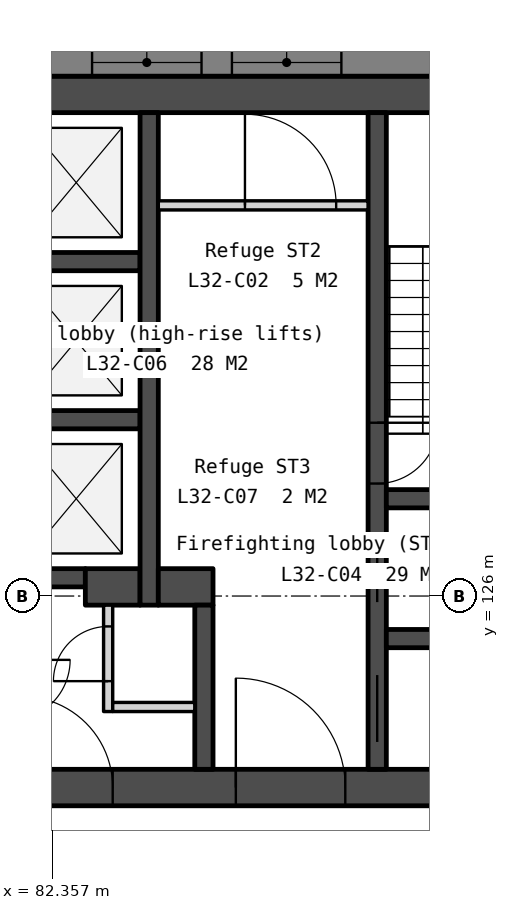
"""IFC4 building model, lengths in metres.
Left out: names, types, materials, properties, quantities, classifications, styles, units other than length and angle.
Written with IfcOpenShell. Run it as: python <this file> out.ifc"""

import sys

from ifc_helpers import new_model, si_unit, direction, frame, frame_2d, origin, place, context, subcontext, project, spatial, polyline, rectangle, outline, extrude, element, fill, save


model = new_model("IFC4")
c1 = context("Model", 3, precision=1e-05, world=origin(), true_north=direction((0.0, 1.0)))
c2 = subcontext(c1, "Body", "Model", "MODEL_VIEW")
j1 = project(units=[si_unit("LENGTHUNIT", "METRE"), si_unit("PLANEANGLEUNIT", "RADIAN")], contexts=[c1])
p1 = place(None, origin())
s1 = spatial("IfcSite", under=j1, at=p1, CompositionType="ELEMENT")
p2 = place(p1, origin())
s2 = spatial("IfcBuilding", under=s1, at=p2, CompositionType="ELEMENT")
p3 = place(p2, frame((0.0, 0.0, 128.6)))
s3 = spatial("IfcBuildingStorey", under=s2, at=p3, CompositionType="ELEMENT", Elevation=128.6)
p4 = place(p3, frame((69.0, 134.25, 0.0), z_axis=(0.0, 0.0, 1.0), x_axis=(1.0, 0.0, 0.0)))
e1 = element("IfcWall", 1, at=p4, inside=s3, PredefinedType="SOLIDWALL", context=c2, shape_type="SweptSolid", body=[
    extrude(rectangle(XDim=22.0, YDim=0.6, at=frame_2d((11.0, 0.0))), origin(), (0.0, 0.0, 1.0), 3.75),
])
p5 = place(p3, frame((69.0, 122.85, 0.0), z_axis=(0.0, 0.0, 1.0), x_axis=(1.0, 0.0, 0.0)))
e2 = element("IfcWall", 2, at=p5, inside=s3, PredefinedType="SOLIDWALL", context=c2, shape_type="SweptSolid", body=[
    extrude(rectangle(XDim=22.0, YDim=0.6, at=frame_2d((11.0, 0.0))), origin(), (0.0, 0.0, 1.0), 3.75),
])
p6 = place(p5, frame((16.375, 0.0, 0.0)))
e3 = element("IfcOpeningElement", 3, at=p6, cuts=e2, PredefinedType="OPENING", context=c2, shape_type="SweptSolid", body=[
    extrude(rectangle(XDim=1.8, YDim=2.1, at=frame_2d((0.9, 1.05))), frame((0.0, 0.31, 0.0), z_axis=(0.0, -1.0, 0.0), x_axis=(1.0, 0.0, 0.0)), (0.0, 0.0, 1.0), 0.62),
])
p7 = place(p5, frame((3.825, 0.0, 0.0)))
e4 = element("IfcOpeningElement", 4, at=p7, cuts=e2, PredefinedType="OPENING", context=c2, shape_type="SweptSolid", body=[
    extrude(rectangle(XDim=1.8, YDim=2.1, at=frame_2d((0.9, 1.05))), frame((0.0, 0.31, 0.0), z_axis=(0.0, -1.0, 0.0), x_axis=(1.0, 0.0, 0.0)), (0.0, 0.0, 1.0), 0.62),
])
p8 = place(p5, frame((12.85, 0.0, 0.0)))
e5 = element("IfcOpeningElement", 5, at=p8, cuts=e2, PredefinedType="OPENING", context=c2, shape_type="SweptSolid", body=[
    extrude(rectangle(XDim=1.5, YDim=2.1, at=frame_2d((0.75, 1.05))), frame((0.0, 0.31, 0.0), z_axis=(0.0, -1.0, 0.0), x_axis=(1.0, 0.0, 0.0)), (0.0, 0.0, 1.0), 0.62),
])
for number, where, z_axis, x_axis in (
    (6, (81.7, 131.5, 0.0), (0.0, 0.0, 1.0), (1.0, 0.0, 0.0)),
    (7, (81.7, 128.9, 0.0), (0.0, 0.0, 1.0), (1.0, 0.0, 0.0)),
):
    element("IfcWall", number, at=place(p3, frame(where, z_axis=z_axis, x_axis=x_axis)), inside=s3, PredefinedType="SOLIDWALL", context=c2, shape_type="SweptSolid", body=[
        extrude(rectangle(XDim=2.1, YDim=0.3, at=frame_2d((1.05, 0.0))), origin(), (0.0, 0.0, 1.0), 3.75),
    ])
p9 = place(p3, frame((81.7, 126.3, 0.0), z_axis=(0.0, 0.0, 1.0), x_axis=(1.0, 0.0, 0.0)))
e8 = element("IfcWall", 8, at=p9, inside=s3, PredefinedType="SOLIDWALL", context=c2, shape_type="SweptSolid", body=[
    extrude(rectangle(XDim=1.2, YDim=0.3, at=frame_2d((0.6, 0.0))), origin(), (0.0, 0.0, 1.0), 3.75),
])
p10 = place(p3, frame((82.9, 126.15, 0.0), z_axis=(0.0, 0.0, 1.0), x_axis=(1.0, 0.0, 0.0)))
e9 = element("IfcWall", 9, at=p10, inside=s3, PredefinedType="SOLIDWALL", context=c2, shape_type="SweptSolid", body=[
    extrude(rectangle(XDim=0.9, YDim=0.6, at=frame_2d((0.45, 0.0))), origin(), (0.0, 0.0, 1.0), 3.75),
])
p11 = place(p3, frame((83.275, 125.85, 0.0), z_axis=(0.0, 0.0, 1.0), x_axis=(0.0, -1.0, 0.0)))
e10 = element("IfcWall", 10, at=p11, inside=s3, PredefinedType="PARTITIONING", context=c2, shape_type="SweptSolid", body=[
    extrude(rectangle(XDim=1.75, YDim=0.15, at=frame_2d((0.875, 0.0))), origin(), (0.0, 0.0, 1.0), 3.75),
])
p12 = place(p11, frame((0.35, 0.0, 0.0)))
e11 = element("IfcOpeningElement", 11, at=p12, cuts=e10, PredefinedType="OPENING", context=c2, shape_type="SweptSolid", body=[
    extrude(rectangle(XDim=0.9, YDim=2.1, at=frame_2d((0.45, 1.05))), frame((0.0, 0.085, 0.0), z_axis=(0.0, -1.0, 0.0), x_axis=(1.0, 0.0, 0.0)), (0.0, 0.0, 1.0), 0.17),
])
p13 = place(p3, frame((83.35, 124.175, 0.0), z_axis=(0.0, 0.0, 1.0), x_axis=(1.0, 0.0, 0.0)))
e12 = element("IfcWall", 12, at=p13, inside=s3, PredefinedType="PARTITIONING", context=c2, shape_type="SweptSolid", body=[
    extrude(rectangle(XDim=1.35, YDim=0.15, at=frame_2d((0.675, 0.0))), origin(), (0.0, 0.0, 1.0), 3.75),
])
p14 = place(p3, frame((83.95, 133.95, 0.0), z_axis=(0.0, 0.0, 1.0), x_axis=(0.0, -1.0, 0.0)))
e13 = element("IfcWall", 13, at=p14, inside=s3, PredefinedType="SOLIDWALL", context=c2, shape_type="SweptSolid", body=[
    extrude(rectangle(XDim=8.1, YDim=0.3, at=frame_2d((4.05, 0.0))), origin(), (0.0, 0.0, 1.0), 3.75),
])
p15 = place(p3, frame((84.1, 132.425, 0.0), z_axis=(0.0, 0.0, 1.0), x_axis=(1.0, 0.0, 0.0)))
e14 = element("IfcWall", 14, at=p15, inside=s3, PredefinedType="PARTITIONING", context=c2, shape_type="SweptSolid", body=[
    extrude(rectangle(XDim=3.45, YDim=0.15, at=frame_2d((1.725, 0.0))), origin(), (0.0, 0.0, 1.0), 3.75),
])
p16 = place(p15, frame((1.425, 0.0, 0.0)))
e15 = element("IfcOpeningElement", 15, at=p16, cuts=e14, PredefinedType="OPENING", context=c2, shape_type="SweptSolid", body=[
    extrude(rectangle(XDim=1.5, YDim=2.1, at=frame_2d((0.75, 1.05))), frame((0.0, 0.085, 0.0), z_axis=(0.0, -1.0, 0.0), x_axis=(1.0, 0.0, 0.0)), (0.0, 0.0, 1.0), 0.17),
])
p17 = place(p3, frame((84.1, 126.15, 0.0), z_axis=(0.0, 0.0, 1.0), x_axis=(1.0, 0.0, 0.0)))
e16 = element("IfcWall", 16, at=p17, inside=s3, PredefinedType="SOLIDWALL", context=c2, shape_type="SweptSolid", body=[
    extrude(rectangle(XDim=0.9, YDim=0.6, at=frame_2d((0.45, 0.0))), origin(), (0.0, 0.0, 1.0), 3.75),
])
p18 = place(p3, frame((84.85, 125.85, 0.0), z_axis=(0.0, 0.0, 1.0), x_axis=(0.0, -1.0, 0.0)))
e17 = element("IfcWall", 17, at=p18, inside=s3, PredefinedType="SOLIDWALL", context=c2, shape_type="SweptSolid", body=[
    extrude(rectangle(XDim=2.7, YDim=0.3, at=frame_2d((1.35, 0.0))), origin(), (0.0, 0.0, 1.0), 3.75),
])
p19 = place(p3, frame((87.7, 133.95, 0.0), z_axis=(0.0, 0.0, 1.0), x_axis=(0.0, -1.0, 0.0)))
e18 = element("IfcWall", 18, at=p19, inside=s3, PredefinedType="SOLIDWALL", context=c2, shape_type="SweptSolid", body=[
    extrude(rectangle(XDim=10.8, YDim=0.3, at=frame_2d((5.4, 0.0))), origin(), (0.0, 0.0, 1.0), 3.75),
])
p20 = place(p19, frame((6.95, 0.0, 0.0)))
e19 = element("IfcOpeningElement", 19, at=p20, cuts=e18, PredefinedType="OPENING", context=c2, shape_type="SweptSolid", body=[
    extrude(rectangle(XDim=1.1, YDim=2.1, at=frame_2d((0.55, 1.05))), frame((0.0, 0.16, 0.0), z_axis=(0.0, -1.0, 0.0), x_axis=(1.0, 0.0, 0.0)), (0.0, 0.0, 1.0), 0.32),
])
p21 = place(p19, frame((5.1, 0.0, 0.0)))
e20 = element("IfcOpeningElement", 20, at=p21, cuts=e18, PredefinedType="OPENING", context=c2, shape_type="SweptSolid", body=[
    extrude(rectangle(XDim=1.0, YDim=2.1, at=frame_2d((0.5, 1.05))), frame((0.0, 0.16, 0.0), z_axis=(0.0, -1.0, 0.0), x_axis=(1.0, 0.0, 0.0)), (0.0, 0.0, 1.0), 0.32),
])
p22 = place(p19, frame((9.25, 0.0, 0.0)))
e21 = element("IfcOpeningElement", 21, at=p22, cuts=e18, PredefinedType="OPENING", context=c2, shape_type="SweptSolid", body=[
    extrude(rectangle(XDim=1.1, YDim=2.1, at=frame_2d((0.55, 1.05))), frame((0.0, 0.16, 0.0), z_axis=(0.0, -1.0, 0.0), x_axis=(1.0, 0.0, 0.0)), (0.0, 0.0, 1.0), 0.32),
])
for number, where, z_axis, x_axis in (
    (22, (87.85, 127.6, 0.0), (0.0, 0.0, 1.0), (1.0, 0.0, 0.0)),
    (23, (87.85, 125.3, 0.0), (0.0, 0.0, 1.0), (1.0, 0.0, 0.0)),
):
    element("IfcWall", number, at=place(p3, frame(where, z_axis=z_axis, x_axis=x_axis)), inside=s3, PredefinedType="SOLIDWALL", context=c2, shape_type="SweptSolid", body=[
        extrude(rectangle(XDim=2.55, YDim=0.3, at=frame_2d((1.275, 0.0))), origin(), (0.0, 0.0, 1.0), 3.75),
    ])
p23 = place(p3, frame((100.243, 134.775, -0.45), z_axis=(0.0, 0.0, 1.0), x_axis=(-1.0, 0.0, 0.0)))
e24 = element("IfcWall", 24, at=p23, inside=s3, PredefinedType="SOLIDWALL", context=c2, shape_type="SweptSolid", body=[
    extrude(outline(polyline([(40.486, 0.0), (40.486, 4.2), (0.0, 4.2), (0.0, 0.0), (40.486, 0.0)])), frame((0.0, 0.225, 0.0), z_axis=(0.0, -1.0, 0.0), x_axis=(1.0, 0.0, 0.0)), (0.0, 0.0, 1.0), 0.45),
])
p24 = place(p23, frame((3.011, 0.0, 1.25)))
e25 = element("IfcOpeningElement", 25, at=p24, cuts=e24, PredefinedType="OPENING", context=c2, shape_type="SweptSolid", body=[
    extrude(rectangle(XDim=1.8, YDim=2.2, at=frame_2d((0.9, 1.1))), frame((0.0, 0.235, 0.0), z_axis=(0.0, -1.0, 0.0), x_axis=(1.0, 0.0, 0.0)), (0.0, 0.0, 1.0), 0.47),
])
p25 = place(p23, frame((5.311, 0.0, 1.25)))
e26 = element("IfcOpeningElement", 26, at=p25, cuts=e24, PredefinedType="OPENING", context=c2, shape_type="SweptSolid", body=[
    extrude(rectangle(XDim=1.8, YDim=2.2, at=frame_2d((0.9, 1.1))), frame((0.0, 0.235, 0.0), z_axis=(0.0, -1.0, 0.0), x_axis=(1.0, 0.0, 0.0)), (0.0, 0.0, 1.0), 0.47),
])
p26 = place(p23, frame((13.132, 0.0, 1.25)))
e27 = element("IfcOpeningElement", 27, at=p26, cuts=e24, PredefinedType="OPENING", context=c2, shape_type="SweptSolid", body=[
    extrude(rectangle(XDim=1.8, YDim=2.2, at=frame_2d((0.9, 1.1))), frame((0.0, 0.235, 0.0), z_axis=(0.0, -1.0, 0.0), x_axis=(1.0, 0.0, 0.0)), (0.0, 0.0, 1.0), 0.47),
])
p27 = place(p23, frame((15.432, 0.0, 1.25)))
e28 = element("IfcOpeningElement", 28, at=p27, cuts=e24, PredefinedType="OPENING", context=c2, shape_type="SweptSolid", body=[
    extrude(rectangle(XDim=1.8, YDim=2.2, at=frame_2d((0.9, 1.1))), frame((0.0, 0.235, 0.0), z_axis=(0.0, -1.0, 0.0), x_axis=(1.0, 0.0, 0.0)), (0.0, 0.0, 1.0), 0.47),
])
p28 = place(p23, frame((23.254, 0.0, 1.25)))
e29 = element("IfcOpeningElement", 29, at=p28, cuts=e24, PredefinedType="OPENING", context=c2, shape_type="SweptSolid", body=[
    extrude(rectangle(XDim=1.8, YDim=2.2, at=frame_2d((0.9, 1.1))), frame((0.0, 0.235, 0.0), z_axis=(0.0, -1.0, 0.0), x_axis=(1.0, 0.0, 0.0)), (0.0, 0.0, 1.0), 0.47),
])
p29 = place(p23, frame((25.554, 0.0, 1.25)))
e30 = element("IfcOpeningElement", 30, at=p29, cuts=e24, PredefinedType="OPENING", context=c2, shape_type="SweptSolid", body=[
    extrude(rectangle(XDim=1.8, YDim=2.2, at=frame_2d((0.9, 1.1))), frame((0.0, 0.235, 0.0), z_axis=(0.0, -1.0, 0.0), x_axis=(1.0, 0.0, 0.0)), (0.0, 0.0, 1.0), 0.47),
])
p30 = place(p23, frame((33.375, 0.0, 1.25)))
e31 = element("IfcOpeningElement", 31, at=p30, cuts=e24, PredefinedType="OPENING", context=c2, shape_type="SweptSolid", body=[
    extrude(rectangle(XDim=1.8, YDim=2.2, at=frame_2d((0.9, 1.1))), frame((0.0, 0.235, 0.0), z_axis=(0.0, -1.0, 0.0), x_axis=(1.0, 0.0, 0.0)), (0.0, 0.0, 1.0), 0.47),
])
p31 = place(p23, frame((35.675, 0.0, 1.25)))
e32 = element("IfcOpeningElement", 32, at=p31, cuts=e24, PredefinedType="OPENING", context=c2, shape_type="SweptSolid", body=[
    extrude(rectangle(XDim=1.8, YDim=2.2, at=frame_2d((0.9, 1.1))), frame((0.0, 0.235, 0.0), z_axis=(0.0, -1.0, 0.0), x_axis=(1.0, 0.0, 0.0)), (0.0, 0.0, 1.0), 0.47),
])
p32 = place(p3, frame((82.105, 96.067, -0.45), z_axis=(0.0, 0.0, 1.0), x_axis=(0.499997369791, 0.866026922331, 0.0)))
e33 = element("IfcWall", 33, at=p32, inside=s3, PredefinedType="SOLIDWALL", context=c2, shape_type="SweptSolid", body=[
    extrude(outline(polyline([(40.486, 0.0), (40.486, 4.2), (0.0, 4.2), (0.0, 0.0), (40.486, 0.0)])), frame((0.0, 0.225, 0.0), z_axis=(0.0, -1.0, 0.0), x_axis=(1.0, 0.0, 0.0)), (0.0, 0.0, 1.0), 0.45),
])
p33 = place(p32, frame((3.011, 0.0, 1.25)))
e34 = element("IfcOpeningElement", 34, at=p33, cuts=e33, PredefinedType="OPENING", context=c2, shape_type="SweptSolid", body=[
    extrude(rectangle(XDim=1.8, YDim=2.2, at=frame_2d((0.9, 1.1))), frame((0.0, 0.235, 0.0), z_axis=(0.0, -1.0, 0.0), x_axis=(1.0, 0.0, 0.0)), (0.0, 0.0, 1.0), 0.47),
])
p34 = place(p32, frame((5.311, 0.0, 1.25)))
e35 = element("IfcOpeningElement", 35, at=p34, cuts=e33, PredefinedType="OPENING", context=c2, shape_type="SweptSolid", body=[
    extrude(rectangle(XDim=1.8, YDim=2.2, at=frame_2d((0.9, 1.1))), frame((0.0, 0.235, 0.0), z_axis=(0.0, -1.0, 0.0), x_axis=(1.0, 0.0, 0.0)), (0.0, 0.0, 1.0), 0.47),
])
p35 = place(p32, frame((13.132, 0.0, 1.25)))
e36 = element("IfcOpeningElement", 36, at=p35, cuts=e33, PredefinedType="OPENING", context=c2, shape_type="SweptSolid", body=[
    extrude(rectangle(XDim=1.8, YDim=2.2, at=frame_2d((0.9, 1.1))), frame((0.0, 0.235, 0.0), z_axis=(0.0, -1.0, 0.0), x_axis=(1.0, 0.0, 0.0)), (0.0, 0.0, 1.0), 0.47),
])
p36 = place(p32, frame((15.432, 0.0, 1.25)))
e37 = element("IfcOpeningElement", 37, at=p36, cuts=e33, PredefinedType="OPENING", context=c2, shape_type="SweptSolid", body=[
    extrude(rectangle(XDim=1.8, YDim=2.2, at=frame_2d((0.9, 1.1))), frame((0.0, 0.235, 0.0), z_axis=(0.0, -1.0, 0.0), x_axis=(1.0, 0.0, 0.0)), (0.0, 0.0, 1.0), 0.47),
])
p37 = place(p32, frame((23.254, 0.0, 1.25)))
e38 = element("IfcOpeningElement", 38, at=p37, cuts=e33, PredefinedType="OPENING", context=c2, shape_type="SweptSolid", body=[
    extrude(rectangle(XDim=1.8, YDim=2.2, at=frame_2d((0.9, 1.1))), frame((0.0, 0.235, 0.0), z_axis=(0.0, -1.0, 0.0), x_axis=(1.0, 0.0, 0.0)), (0.0, 0.0, 1.0), 0.47),
])
p38 = place(p32, frame((25.554, 0.0, 1.25)))
e39 = element("IfcOpeningElement", 39, at=p38, cuts=e33, PredefinedType="OPENING", context=c2, shape_type="SweptSolid", body=[
    extrude(rectangle(XDim=1.8, YDim=2.2, at=frame_2d((0.9, 1.1))), frame((0.0, 0.235, 0.0), z_axis=(0.0, -1.0, 0.0), x_axis=(1.0, 0.0, 0.0)), (0.0, 0.0, 1.0), 0.47),
])
p39 = place(p32, frame((33.375, 0.0, 1.25)))
e40 = element("IfcOpeningElement", 40, at=p39, cuts=e33, PredefinedType="OPENING", context=c2, shape_type="SweptSolid", body=[
    extrude(rectangle(XDim=1.8, YDim=2.2, at=frame_2d((0.9, 1.1))), frame((0.0, 0.235, 0.0), z_axis=(0.0, -1.0, 0.0), x_axis=(1.0, 0.0, 0.0)), (0.0, 0.0, 1.0), 0.47),
])
p40 = place(p32, frame((35.675, 0.0, 1.25)))
e41 = element("IfcOpeningElement", 41, at=p40, cuts=e33, PredefinedType="OPENING", context=c2, shape_type="SweptSolid", body=[
    extrude(rectangle(XDim=1.8, YDim=2.2, at=frame_2d((0.9, 1.1))), frame((0.0, 0.235, 0.0), z_axis=(0.0, -1.0, 0.0), x_axis=(1.0, 0.0, 0.0)), (0.0, 0.0, 1.0), 0.47),
])
p41 = place(p20, origin())
e42 = element("IfcDoor", 42, at=p41, inside=s3, OperationType="SLIDING_TO_LEFT", PredefinedType="DOOR", context=c2, shape_type="SweptSolid", body=[
    extrude(rectangle(XDim=1.1, YDim=2.1, at=frame_2d((0.55, 1.05))), frame((0.0, 0.025, 0.0), z_axis=(0.0, -1.0, 0.0), x_axis=(1.0, 0.0, 0.0)), (0.0, 0.0, 1.0), 0.05),
])
fill(e19, e42)
p42 = place(p6, origin())
e43 = element("IfcDoor", 43, at=p42, inside=s3, OperationType="DOUBLE_DOOR_DOUBLE_SWING", PredefinedType="DOOR", context=c2, shape_type="SweptSolid", body=[
    extrude(rectangle(XDim=1.8, YDim=2.1, at=frame_2d((0.9, 1.05))), frame((0.0, 0.025, 0.0), z_axis=(0.0, -1.0, 0.0), x_axis=(1.0, 0.0, 0.0)), (0.0, 0.0, 1.0), 0.05),
])
fill(e3, e43)
p43 = place(p8, origin())
e44 = element("IfcDoor", 44, at=p43, inside=s3, OperationType="DOUBLE_DOOR_DOUBLE_SWING", PredefinedType="DOOR", context=c2, shape_type="SweptSolid", body=[
    extrude(rectangle(XDim=1.5, YDim=2.1, at=frame_2d((0.75, 1.05))), frame((0.0, 0.025, 0.0), z_axis=(0.0, -1.0, 0.0), x_axis=(1.0, 0.0, 0.0)), (0.0, 0.0, 1.0), 0.05),
])
fill(e5, e44)
p44 = place(p12, origin())
e45 = element("IfcDoor", 45, at=p44, inside=s3, OperationType="SINGLE_SWING_RIGHT", PredefinedType="DOOR", context=c2, shape_type="SweptSolid", body=[
    extrude(rectangle(XDim=0.9, YDim=2.1, at=frame_2d((0.45, 1.05))), frame((0.0, 0.025, 0.0), z_axis=(0.0, -1.0, 0.0), x_axis=(1.0, 0.0, 0.0)), (0.0, 0.0, 1.0), 0.05),
])
fill(e11, e45)
p45 = place(p16, origin())
e46 = element("IfcDoor", 46, at=p45, inside=s3, OperationType="DOUBLE_DOOR_DOUBLE_SWING", PredefinedType="DOOR", context=c2, shape_type="SweptSolid", body=[
    extrude(rectangle(XDim=1.5, YDim=2.1, at=frame_2d((0.75, 1.05))), frame((0.0, 0.025, 0.0), z_axis=(0.0, -1.0, 0.0), x_axis=(1.0, 0.0, 0.0)), (0.0, 0.0, 1.0), 0.05),
])
fill(e15, e46)
p46 = place(p21, origin())
e47 = element("IfcDoor", 47, at=p46, inside=s3, OperationType="SINGLE_SWING_LEFT", PredefinedType="DOOR", context=c2, shape_type="SweptSolid", body=[
    extrude(rectangle(XDim=1.0, YDim=2.1, at=frame_2d((0.5, 1.05))), frame((0.0, 0.025, 0.0), z_axis=(0.0, -1.0, 0.0), x_axis=(1.0, 0.0, 0.0)), (0.0, 0.0, 1.0), 0.05),
])
fill(e20, e47)
p47 = place(p22, origin())
e48 = element("IfcDoor", 48, at=p47, inside=s3, OperationType="SLIDING_TO_LEFT", PredefinedType="DOOR", context=c2, shape_type="SweptSolid", body=[
    extrude(rectangle(XDim=1.1, YDim=2.1, at=frame_2d((0.55, 1.05))), frame((0.0, 0.025, 0.0), z_axis=(0.0, -1.0, 0.0), x_axis=(1.0, 0.0, 0.0)), (0.0, 0.0, 1.0), 0.05),
])
fill(e21, e48)
p48 = place(p26, origin())
e49 = element("IfcWindow", 49, at=p48, inside=s3, PartitioningType="SINGLE_PANEL", PredefinedType="WINDOW", context=c2, shape_type="SweptSolid", body=[
    extrude(rectangle(XDim=1.8, YDim=2.2, at=frame_2d((0.9, 1.1))), frame((0.0, 0.03, 0.0), z_axis=(0.0, -1.0, 0.0), x_axis=(1.0, 0.0, 0.0)), (0.0, 0.0, 1.0), 0.06),
])
fill(e27, e49)
p49 = place(p27, origin())
e50 = element("IfcWindow", 50, at=p49, inside=s3, PartitioningType="SINGLE_PANEL", PredefinedType="WINDOW", context=c2, shape_type="SweptSolid", body=[
    extrude(rectangle(XDim=1.8, YDim=2.2, at=frame_2d((0.9, 1.1))), frame((0.0, 0.03, 0.0), z_axis=(0.0, -1.0, 0.0), x_axis=(1.0, 0.0, 0.0)), (0.0, 0.0, 1.0), 0.06),
])
fill(e28, e50)
save(model, sys.argv[1])
